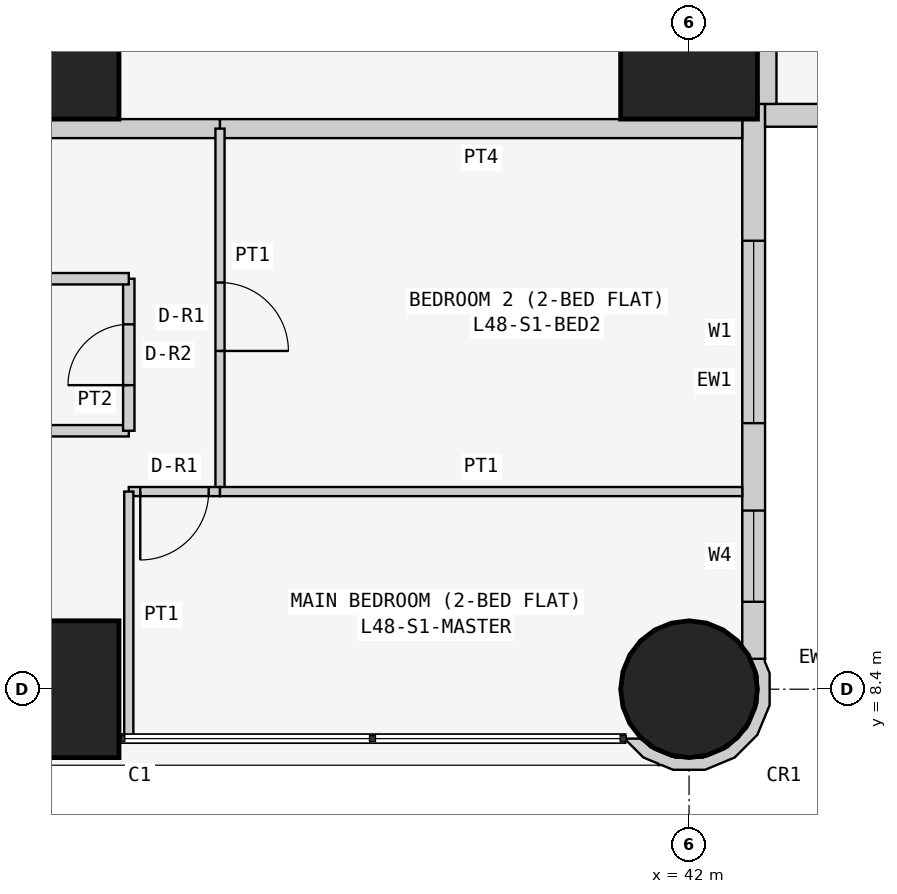
"""IFC4 building model, lengths in metres.
Left out: names, types, materials, properties, quantities, classifications, styles, units other than length and angle.
Written with IfcOpenShell. Run it as: python <this file> out.ifc"""

import sys

from ifc_helpers import new_model, si_unit, direction, frame, frame_2d, origin, origin_2d, place, context, subcontext, project, spatial, polyline, rectangle, circle, outline, extrude, element, fill, save


model = new_model("IFC4")
c1 = context("Model", 3, precision=1e-05, world=origin(), true_north=direction((0.0, 1.0)))
c2 = subcontext(c1, "Body", "Model", "MODEL_VIEW")
j1 = project(units=[si_unit("LENGTHUNIT", "METRE"), si_unit("PLANEANGLEUNIT", "RADIAN")], contexts=[c1])
p1 = place(None, origin())
s1 = spatial("IfcSite", under=j1, at=p1, CompositionType="ELEMENT")
p2 = place(p1, origin())
s2 = spatial("IfcBuilding", under=s1, at=p2, CompositionType="ELEMENT")
p3 = place(p2, frame((0.0, 0.0, 186.9)))
s3 = spatial("IfcBuildingStorey", under=s2, at=p3, CompositionType="ELEMENT", Elevation=186.9)
for number, where, z_axis, x_axis in (
    (1, (33.6, 8.4, 0.0), (0.0, 0.0, 1.0), (1.0, 0.0, 0.0)),
    (2, (33.6, 16.8, 0.0), (0.0, 0.0, 1.0), (1.0, 0.0, 0.0)),
):
    element("IfcColumn", number, at=place(p3, frame(where, z_axis=z_axis, x_axis=x_axis)), inside=s3, PredefinedType="COLUMN", context=c2, shape_type="SweptSolid", body=[
        extrude(rectangle(XDim=1.8, YDim=1.8, at=origin_2d()), origin(), (0.0, 0.0, 1.0), 3.6),
    ])
p4 = place(p3, frame((42.0, 8.4, 0.0), z_axis=(0.0, 0.0, 1.0), x_axis=(1.0, 0.0, 0.0)))
e3 = element("IfcColumn", 3, at=p4, inside=s3, PredefinedType="COLUMN", context=c2, shape_type="SweptSolid", body=[
    extrude(circle(Radius=0.9, at=origin_2d()), origin(), (0.0, 0.0, 1.0), 3.6),
])
p5 = place(p3, frame((42.0, 16.8, 0.0), z_axis=(0.0, 0.0, 1.0), x_axis=(1.0, 0.0, 0.0)))
e4 = element("IfcColumn", 4, at=p5, inside=s3, PredefinedType="COLUMN", context=c2, shape_type="SweptSolid", body=[
    extrude(rectangle(XDim=1.8, YDim=1.8, at=origin_2d()), origin(), (0.0, 0.0, 1.0), 3.6),
])
p6 = place(p3, frame((42.85, 8.8, 0.0), z_axis=(0.0, 0.0, 1.0), x_axis=(0.0, 1.0, 0.0)))
e5 = element("IfcWall", 5, at=p6, inside=s3, PredefinedType="SOLIDWALL", context=c2, shape_type="SweptSolid", body=[
    extrude(rectangle(XDim=7.3, YDim=0.3, at=frame_2d((3.65, 0.0))), origin(), (0.0, 0.0, 1.0), 3.45),
])
p7 = place(p6, frame((3.1, 0.0, 0.9)))
e6 = element("IfcOpeningElement", 6, at=p7, cuts=e5, PredefinedType="OPENING", context=c2, shape_type="SweptSolid", body=[
    extrude(rectangle(XDim=2.4, YDim=1.5, at=frame_2d((1.2, 0.75))), frame((0.0, 0.16, 0.0), z_axis=(0.0, -1.0, 0.0), x_axis=(1.0, 0.0, 0.0)), (0.0, 0.0, 1.0), 0.32),
])
p8 = place(p6, frame((0.75, 0.0, 0.9)))
e7 = element("IfcOpeningElement", 7, at=p8, cuts=e5, PredefinedType="OPENING", context=c2, shape_type="SweptSolid", body=[
    extrude(rectangle(XDim=1.2, YDim=1.5, at=frame_2d((0.6, 0.75))), frame((0.0, 0.16, 0.0), z_axis=(0.0, -1.0, 0.0), x_axis=(1.0, 0.0, 0.0)), (0.0, 0.0, 1.0), 0.32),
])
p9 = place(p3, frame((43.0, 15.95, 0.0), z_axis=(0.0, 0.0, 1.0), x_axis=(1.0, 0.0, 0.0)))
e8 = element("IfcWall", 8, at=p9, inside=s3, PredefinedType="SOLIDWALL", context=c2, shape_type="SweptSolid", body=[
    extrude(rectangle(XDim=7.0, YDim=0.3, at=frame_2d((3.5, 0.0))), origin(), (0.0, 0.0, 1.0), 3.45),
])
p10 = place(p9, frame((1.5, 0.0, 0.9)))
e9 = element("IfcOpeningElement", 9, at=p10, cuts=e8, PredefinedType="OPENING", context=c2, shape_type="SweptSolid", body=[
    extrude(rectangle(XDim=2.4, YDim=1.5, at=frame_2d((1.2, 0.75))), frame((0.0, 0.16, 0.0), z_axis=(0.0, -1.0, 0.0), x_axis=(1.0, 0.0, 0.0)), (0.0, 0.0, 1.0), 0.32),
])
p11 = place(p9, frame((5.05, 0.0, 0.9)))
e10 = element("IfcOpeningElement", 10, at=p11, cuts=e8, PredefinedType="OPENING", context=c2, shape_type="SweptSolid", body=[
    extrude(rectangle(XDim=1.2, YDim=1.5, at=frame_2d((0.6, 0.75))), frame((0.0, 0.16, 0.0), z_axis=(0.0, -1.0, 0.0), x_axis=(1.0, 0.0, 0.0)), (0.0, 0.0, 1.0), 0.32),
])
p12 = place(p3, frame((41.233, 7.789, 0.0), z_axis=(0.0, 0.0, 1.0), x_axis=(0.377204953059, -0.926129809145, 0.0)))
e11 = element("IfcWall", 11, at=p12, inside=s3, PredefinedType="SOLIDWALL", context=c2, shape_type="SweptSolid", body=[
    extrude(outline(polyline([(0.319, 1.842), (-0.072, 2.002), (-0.24, 2.001), (-0.27, 2.017), (-0.37, 1.841), (-0.102, 1.842), (0.23, 1.707), (0.485, 1.455), (0.624, 1.125), (0.626, 0.766), (0.491, 0.434), (0.239, 0.179), (0.09, 0.117), (0.011, -0.078), (0.025, -0.083), (0.329, 0.045), (0.48, 0.198), (0.499, 0.193), (0.508, 0.225), (0.626, 0.345), (0.785, 0.736), (0.782, 1.157), (0.619, 1.546), (0.319, 1.842)])), origin(), (0.0, 0.0, 1.0), 3.45),
])
p13 = place(p3, frame((43.025, 22.971, 0.0), z_axis=(0.0, 0.0, 1.0), x_axis=(0.0, -1.0, 0.0)))
e12 = element("IfcWall", 12, at=p13, inside=s3, PredefinedType="PARTITIONING", context=c2, shape_type="SweptSolid", body=[
    extrude(rectangle(XDim=6.871, YDim=0.25, at=frame_2d((3.436, 0.0))), origin(), (0.0, 0.0, 1.0), 3.45),
])
p14 = place(p3, frame((35.829, 15.775, 0.0), z_axis=(0.0, 0.0, 1.0), x_axis=(-1.0, 0.0, 0.0)))
e13 = element("IfcWall", 13, at=p14, inside=s3, PredefinedType="PARTITIONING", context=c2, shape_type="SweptSolid", body=[
    extrude(rectangle(XDim=6.429, YDim=0.25, at=frame_2d((3.215, 0.0))), origin(), (0.0, 0.0, 1.0), 3.45),
])
p15 = place(p14, frame((4.929, 0.0, 0.0)))
e14 = element("IfcOpeningElement", 14, at=p15, cuts=e13, PredefinedType="OPENING", context=c2, shape_type="SweptSolid", body=[
    extrude(rectangle(XDim=1.0, YDim=2.1, at=frame_2d((0.5, 1.05))), frame((0.0, 0.135, 0.0), z_axis=(0.0, -1.0, 0.0), x_axis=(1.0, 0.0, 0.0)), (0.0, 0.0, 1.0), 0.27),
])
p16 = place(p3, frame((42.7, 15.775, 0.0), z_axis=(0.0, 0.0, 1.0), x_axis=(-1.0, 0.0, 0.0)))
e15 = element("IfcWall", 15, at=p16, inside=s3, PredefinedType="PARTITIONING", context=c2, shape_type="SweptSolid", body=[
    extrude(rectangle(XDim=6.871, YDim=0.25, at=frame_2d((3.436, 0.0))), origin(), (0.0, 0.0, 1.0), 3.45),
])
p17 = place(p3, frame((29.4, 11.8, 0.0), z_axis=(0.0, 0.0, 1.0), x_axis=(1.0, 0.0, 0.0)))
e16 = element("IfcWall", 16, at=p17, inside=s3, PredefinedType="PARTITIONING", context=c2, shape_type="SweptSolid", body=[
    extrude(rectangle(XDim=5.229, YDim=0.15, at=frame_2d((2.615, 0.0))), origin(), (0.0, 0.0, 1.0), 3.45),
])
p18 = place(p3, frame((34.629, 11.8, 0.0), z_axis=(0.0, 0.0, 1.0), x_axis=(0.0, 1.0, 0.0)))
e17 = element("IfcWall", 17, at=p18, inside=s3, PredefinedType="PARTITIONING", context=c2, shape_type="SweptSolid", body=[
    extrude(rectangle(XDim=2.0, YDim=0.15, at=frame_2d((1.0, 0.0))), origin(), (0.0, 0.0, 1.0), 3.45),
])
p19 = place(p18, frame((0.6, 0.0, 0.0)))
e18 = element("IfcOpeningElement", 18, at=p19, cuts=e17, PredefinedType="OPENING", context=c2, shape_type="SweptSolid", body=[
    extrude(rectangle(XDim=0.8, YDim=2.1, at=frame_2d((0.4, 1.05))), frame((0.0, 0.085, 0.0), z_axis=(0.0, -1.0, 0.0), x_axis=(1.0, 0.0, 0.0)), (0.0, 0.0, 1.0), 0.17),
])
p20 = place(p3, frame((34.629, 13.8, 0.0), z_axis=(0.0, 0.0, 1.0), x_axis=(-1.0, 0.0, 0.0)))
e19 = element("IfcWall", 19, at=p20, inside=s3, PredefinedType="PARTITIONING", context=c2, shape_type="SweptSolid", body=[
    extrude(rectangle(XDim=5.229, YDim=0.15, at=frame_2d((2.615, 0.0))), origin(), (0.0, 0.0, 1.0), 3.45),
])
p21 = place(p3, frame((35.829, 15.775, 0.0), z_axis=(0.0, 0.0, 1.0), x_axis=(0.0, -1.0, 0.0)))
e20 = element("IfcWall", 20, at=p21, inside=s3, PredefinedType="PARTITIONING", context=c2, shape_type="SweptSolid", body=[
    extrude(rectangle(XDim=4.775, YDim=0.12, at=frame_2d((2.387, 0.0))), origin(), (0.0, 0.0, 1.0), 3.45),
])
p22 = place(p21, frame((2.025, 0.0, 0.0)))
e21 = element("IfcOpeningElement", 21, at=p22, cuts=e20, PredefinedType="OPENING", context=c2, shape_type="SweptSolid", body=[
    extrude(rectangle(XDim=0.9, YDim=2.1, at=frame_2d((0.45, 1.05))), frame((0.0, 0.07, 0.0), z_axis=(0.0, -1.0, 0.0), x_axis=(1.0, 0.0, 0.0)), (0.0, 0.0, 1.0), 0.14),
])
p23 = place(p3, frame((35.829, 11.0, 0.0), z_axis=(0.0, 0.0, 1.0), x_axis=(-1.0, 0.0, 0.0)))
e22 = element("IfcWall", 22, at=p23, inside=s3, PredefinedType="PARTITIONING", context=c2, shape_type="SweptSolid", body=[
    extrude(rectangle(XDim=1.2, YDim=0.12, at=frame_2d((0.6, 0.0))), origin(), (0.0, 0.0, 1.0), 3.45),
])
p24 = place(p23, frame((0.149, 0.0, 0.0)))
e23 = element("IfcOpeningElement", 23, at=p24, cuts=e22, PredefinedType="OPENING", context=c2, shape_type="SweptSolid", body=[
    extrude(rectangle(XDim=0.9, YDim=2.1, at=frame_2d((0.45, 1.05))), frame((0.0, 0.07, 0.0), z_axis=(0.0, -1.0, 0.0), x_axis=(1.0, 0.0, 0.0)), (0.0, 0.0, 1.0), 0.14),
])
p25 = place(p3, frame((34.629, 11.0, 0.0), z_axis=(0.0, 0.0, 1.0), x_axis=(0.0, -1.0, 0.0)))
e24 = element("IfcWall", 24, at=p25, inside=s3, PredefinedType="PARTITIONING", context=c2, shape_type="SweptSolid", body=[
    extrude(rectangle(XDim=3.25, YDim=0.12, at=frame_2d((1.625, 0.0))), origin(), (0.0, 0.0, 1.0), 3.45),
])
p26 = place(p3, frame((35.829, 11.0, 0.0), z_axis=(0.0, 0.0, 1.0), x_axis=(1.0, 0.0, 0.0)))
e25 = element("IfcWall", 25, at=p26, inside=s3, PredefinedType="PARTITIONING", context=c2, shape_type="SweptSolid", body=[
    extrude(rectangle(XDim=6.871, YDim=0.12, at=frame_2d((3.436, 0.0))), origin(), (0.0, 0.0, 1.0), 3.45),
])
p27 = place(p7, origin())
e26 = element("IfcWindow", 26, at=p27, inside=s3, PartitioningType="SINGLE_PANEL", PredefinedType="WINDOW", context=c2, shape_type="SweptSolid", body=[
    extrude(rectangle(XDim=2.4, YDim=1.5, at=frame_2d((1.2, 0.75))), frame((0.0, 0.03, 0.0), z_axis=(0.0, -1.0, 0.0), x_axis=(1.0, 0.0, 0.0)), (0.0, 0.0, 1.0), 0.06),
])
fill(e6, e26)
p28 = place(p8, origin())
e27 = element("IfcWindow", 27, at=p28, inside=s3, PartitioningType="SINGLE_PANEL", PredefinedType="WINDOW", context=c2, shape_type="SweptSolid", body=[
    extrude(rectangle(XDim=1.2, YDim=1.5, at=frame_2d((0.6, 0.75))), frame((0.0, 0.03, 0.0), z_axis=(0.0, -1.0, 0.0), x_axis=(1.0, 0.0, 0.0)), (0.0, 0.0, 1.0), 0.06),
])
fill(e7, e27)
p29 = place(p19, origin())
e28 = element("IfcDoor", 28, at=p29, inside=s3, OperationType="SINGLE_SWING_LEFT", PredefinedType="DOOR", context=c2, shape_type="SweptSolid", body=[
    extrude(rectangle(XDim=0.8, YDim=2.1, at=frame_2d((0.4, 1.05))), frame((0.0, 0.025, 0.0), z_axis=(0.0, -1.0, 0.0), x_axis=(1.0, 0.0, 0.0)), (0.0, 0.0, 1.0), 0.05),
])
fill(e18, e28)
p30 = place(p22, origin())
e29 = element("IfcDoor", 29, at=p30, inside=s3, OperationType="SINGLE_SWING_RIGHT", PredefinedType="DOOR", context=c2, shape_type="SweptSolid", body=[
    extrude(rectangle(XDim=0.9, YDim=2.1, at=frame_2d((0.45, 1.05))), frame((0.0, 0.025, 0.0), z_axis=(0.0, -1.0, 0.0), x_axis=(1.0, 0.0, 0.0)), (0.0, 0.0, 1.0), 0.05),
])
fill(e21, e29)
p31 = place(p24, origin())
e30 = element("IfcDoor", 30, at=p31, inside=s3, OperationType="SINGLE_SWING_RIGHT", PredefinedType="DOOR", context=c2, shape_type="SweptSolid", body=[
    extrude(rectangle(XDim=0.9, YDim=2.1, at=frame_2d((0.45, 1.05))), frame((0.0, 0.025, 0.0), z_axis=(0.0, -1.0, 0.0), x_axis=(1.0, 0.0, 0.0)), (0.0, 0.0, 1.0), 0.05),
])
fill(e23, e30)
save(model, sys.argv[1])
